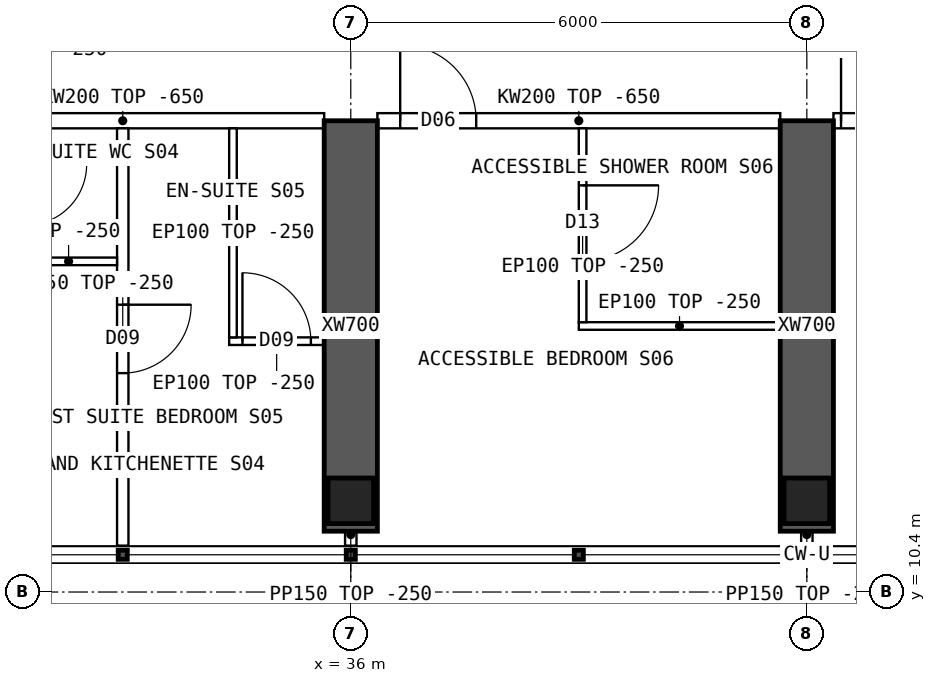
"""IFC4 building model, lengths in metres.
Left out: names, types, materials, properties, quantities, classifications, styles, units other than length and angle.
Written with IfcOpenShell. Run it as: python <this file> out.ifc"""

import sys

from ifc_helpers import new_model, si_unit, direction, frame, frame_2d, origin, origin_2d, place, context, subcontext, project, spatial, polyline, rectangle, hollow_rectangle, outline, extrude, element, fill, save


model = new_model("IFC4")
c1 = context("Model", 3, precision=1e-05, world=origin(), true_north=direction((0.0, 1.0)))
c2 = subcontext(c1, "Body", "Model", "MODEL_VIEW")
j1 = project(units=[si_unit("LENGTHUNIT", "METRE"), si_unit("PLANEANGLEUNIT", "RADIAN")], contexts=[c1])
p1 = place(None, origin())
s1 = spatial("IfcSite", under=j1, at=p1, CompositionType="ELEMENT")
p2 = place(p1, origin())
s2 = spatial("IfcBuilding", under=s1, at=p2, CompositionType="ELEMENT")
p3 = place(p2, frame((0.0, 0.0, 235.3)))
s3 = spatial("IfcBuildingStorey", under=s2, at=p3, CompositionType="ELEMENT", Elevation=235.3)
for number, where, z_axis, x_axis in (
    (1, (36.0, 11.6, 0.0), (0.0, 0.0, 1.0), (1.0, 0.0, 0.0)),
    (2, (42.0, 11.6, 0.0), (0.0, 0.0, 1.0), (1.0, 0.0, 0.0)),
):
    element("IfcColumn", number, at=place(p3, frame(where, z_axis=z_axis, x_axis=x_axis)), inside=s3, PredefinedType="COLUMN", context=c2, shape_type="SweptSolid", body=[
        extrude(hollow_rectangle(XDim=0.6, YDim=0.6, WallThickness=0.06, at=origin_2d()), origin(), (0.0, 0.0, 1.0), 3.75),
    ])
for number, where, z_axis, x_axis in (
    (3, (36.0, 11.2, 0.0), (0.0, 0.0, 1.0), (0.0, 1.0, 0.0)),
    (4, (42.0, 11.2, 0.0), (0.0, 0.0, 1.0), (0.0, 1.0, 0.0)),
):
    element("IfcWall", number, at=place(p3, frame(where, z_axis=z_axis, x_axis=x_axis)), inside=s3, PredefinedType="SHEAR", context=c2, shape_type="SweptSolid", body=[
        extrude(rectangle(XDim=5.4, YDim=0.7, at=frame_2d((2.7, 0.0))), origin(), (0.0, 0.0, 1.0), 3.75),
    ])
p4 = place(p3, frame((30.35, 16.6, 0.0), z_axis=(0.0, 0.0, 1.0), x_axis=(1.0, 0.0, 0.0)))
e5 = element("IfcWall", 5, at=p4, inside=s3, PredefinedType="SOLIDWALL", context=c2, shape_type="SweptSolid", body=[
    extrude(outline(polyline([(0.0, 0.0), (5.3, 0.0), (5.3, 3.1), (0.0, 3.1), (0.0, 0.0)])), frame((0.0, 0.1, 0.0), z_axis=(0.0, -1.0, 0.0), x_axis=(1.0, 0.0, 0.0)), (0.0, 0.0, 1.0), 0.2),
])
p5 = place(p4, frame((0.3, 0.0, 0.0)))
e6 = element("IfcOpeningElement", 6, at=p5, cuts=e5, PredefinedType="OPENING", context=c2, shape_type="SweptSolid", body=[
    extrude(rectangle(XDim=0.9, YDim=2.1, at=frame_2d((0.45, 1.05))), frame((0.0, 0.11, 0.0), z_axis=(0.0, -1.0, 0.0), x_axis=(1.0, 0.0, 0.0)), (0.0, 0.0, 1.0), 0.22),
])
p6 = place(p3, frame((36.35, 16.6, 0.0), z_axis=(0.0, 0.0, 1.0), x_axis=(1.0, 0.0, 0.0)))
e7 = element("IfcWall", 7, at=p6, inside=s3, PredefinedType="SOLIDWALL", context=c2, shape_type="SweptSolid", body=[
    extrude(outline(polyline([(0.0, 0.0), (5.3, 0.0), (5.3, 3.1), (0.0, 3.1), (0.0, 0.0)])), frame((0.0, 0.1, 0.0), z_axis=(0.0, -1.0, 0.0), x_axis=(1.0, 0.0, 0.0)), (0.0, 0.0, 1.0), 0.2),
])
p7 = place(p6, frame((0.3, 0.0, 0.0)))
e8 = element("IfcOpeningElement", 8, at=p7, cuts=e7, PredefinedType="OPENING", context=c2, shape_type="SweptSolid", body=[
    extrude(rectangle(XDim=1.0, YDim=2.1, at=frame_2d((0.5, 1.05))), frame((0.0, 0.11, 0.0), z_axis=(0.0, -1.0, 0.0), x_axis=(1.0, 0.0, 0.0)), (0.0, 0.0, 1.0), 0.22),
])
p8 = place(p3, frame((42.35, 16.6, 0.0), z_axis=(0.0, 0.0, 1.0), x_axis=(1.0, 0.0, 0.0)))
e9 = element("IfcWall", 9, at=p8, inside=s3, PredefinedType="SOLIDWALL", context=c2, shape_type="SweptSolid", body=[
    extrude(outline(polyline([(0.0, 0.0), (5.3, 0.0), (5.3, 3.1), (0.0, 3.1), (0.0, 0.0)])), frame((0.0, 0.1, 0.0), z_axis=(0.0, -1.0, 0.0), x_axis=(1.0, 0.0, 0.0)), (0.0, 0.0, 1.0), 0.2),
])
p9 = place(p8, frame((0.1, 0.0, 0.0)))
e10 = element("IfcOpeningElement", 10, at=p9, cuts=e9, PredefinedType="OPENING", context=c2, shape_type="SweptSolid", body=[
    extrude(rectangle(XDim=0.9, YDim=2.1, at=frame_2d((0.45, 1.05))), frame((0.0, 0.11, 0.0), z_axis=(0.0, -1.0, 0.0), x_axis=(1.0, 0.0, 0.0)), (0.0, 0.0, 1.0), 0.22),
])
p10 = place(p3, frame((33.0, 11.01, 0.0), z_axis=(0.0, 0.0, 1.0), x_axis=(0.0, 1.0, 0.0)))
e11 = element("IfcWall", 11, at=p10, inside=s3, PredefinedType="PARTITIONING", context=c2, shape_type="SweptSolid", body=[
    extrude(outline(polyline([(0.0, 0.0), (5.49, 0.0), (5.49, 3.1), (5.442, 3.1), (5.44, 3.5), (0.792, 3.5), (0.79, 3.1), (0.392, 3.1), (0.39, 3.5), (0.0, 3.5), (0.0, 0.0)])), frame((0.0, 0.075, 0.0), z_axis=(0.0, -1.0, 0.0), x_axis=(1.0, 0.0, 0.0)), (0.0, 0.0, 1.0), 0.15),
])
p11 = place(p10, frame((2.27, 0.0, 0.0)))
e12 = element("IfcOpeningElement", 12, at=p11, cuts=e11, PredefinedType="OPENING", context=c2, shape_type="SweptSolid", body=[
    extrude(rectangle(XDim=0.9, YDim=2.1, at=frame_2d((0.45, 1.05))), frame((0.0, 0.085, 0.0), z_axis=(0.0, -1.0, 0.0), x_axis=(1.0, 0.0, 0.0)), (0.0, 0.0, 1.0), 0.17),
])
p12 = place(p3, frame((35.65, 13.7, 0.0), z_axis=(0.0, 0.0, 1.0), x_axis=(-1.0, 0.0, 0.0)))
e13 = element("IfcWall", 13, at=p12, inside=s3, PredefinedType="PARTITIONING", context=c2, shape_type="SweptSolid", body=[
    extrude(rectangle(XDim=1.25, YDim=0.1, at=frame_2d((0.625, 0.0))), origin(), (0.0, 0.0, 1.0), 3.5),
])
p13 = place(p12, frame((0.175, 0.0, 0.0)))
e14 = element("IfcOpeningElement", 14, at=p13, cuts=e13, PredefinedType="OPENING", context=c2, shape_type="SweptSolid", body=[
    extrude(rectangle(XDim=0.9, YDim=2.1, at=frame_2d((0.45, 1.05))), frame((0.0, 0.06, 0.0), z_axis=(0.0, -1.0, 0.0), x_axis=(1.0, 0.0, 0.0)), (0.0, 0.0, 1.0), 0.12),
])
p14 = place(p3, frame((34.45, 13.75, 0.0), z_axis=(0.0, 0.0, 1.0), x_axis=(0.0, 1.0, 0.0)))
e15 = element("IfcWall", 15, at=p14, inside=s3, PredefinedType="PARTITIONING", context=c2, shape_type="SweptSolid", body=[
    extrude(outline(polyline([(0.0, 0.0), (2.75, 0.0), (2.75, 3.1), (2.702, 3.1), (2.7, 3.5), (0.0, 3.5), (0.0, 0.0)])), frame((0.0, 0.05, 0.0), z_axis=(0.0, -1.0, 0.0), x_axis=(1.0, 0.0, 0.0)), (0.0, 0.0, 1.0), 0.1),
])
p15 = place(p3, frame((31.65, 14.75, 0.0), z_axis=(0.0, 0.0, 1.0), x_axis=(1.0, 0.0, 0.0)))
e16 = element("IfcWall", 16, at=p15, inside=s3, PredefinedType="PARTITIONING", context=c2, shape_type="SweptSolid", body=[
    extrude(rectangle(XDim=1.275, YDim=0.1, at=frame_2d((0.638, 0.0))), origin(), (0.0, 0.0, 1.0), 3.5),
])
p16 = place(p3, frame((39.0, 13.9, 0.0), z_axis=(0.0, 0.0, 1.0), x_axis=(1.0, 0.0, 0.0)))
e17 = element("IfcWall", 17, at=p16, inside=s3, PredefinedType="PARTITIONING", context=c2, shape_type="SweptSolid", body=[
    extrude(rectangle(XDim=2.65, YDim=0.1, at=frame_2d((1.325, 0.0))), origin(), (0.0, 0.0, 1.0), 3.5),
])
p17 = place(p3, frame((39.05, 13.95, 0.0), z_axis=(0.0, 0.0, 1.0), x_axis=(0.0, 1.0, 0.0)))
e18 = element("IfcWall", 18, at=p17, inside=s3, PredefinedType="PARTITIONING", context=c2, shape_type="SweptSolid", body=[
    extrude(outline(polyline([(0.0, 0.0), (2.55, 0.0), (2.55, 3.1), (2.502, 3.1), (2.5, 3.5), (0.0, 3.5), (0.0, 0.0)])), frame((0.0, 0.05, 0.0), z_axis=(0.0, -1.0, 0.0), x_axis=(1.0, 0.0, 0.0)), (0.0, 0.0, 1.0), 0.1),
])
p18 = place(p17, frame((0.8, 0.0, 0.0)))
e19 = element("IfcOpeningElement", 19, at=p18, cuts=e18, PredefinedType="OPENING", context=c2, shape_type="SweptSolid", body=[
    extrude(rectangle(XDim=1.0, YDim=2.1, at=frame_2d((0.5, 1.05))), frame((0.0, 0.06, 0.0), z_axis=(0.0, -1.0, 0.0), x_axis=(1.0, 0.0, 0.0)), (0.0, 0.0, 1.0), 0.12),
])
for number, where, z_axis, x_axis in (
    (20, (36.0, 11.3, 0.0), (0.0, 0.0, 1.0), (0.0, -1.0, 0.0)),
    (21, (42.0, 11.3, 0.0), (0.0, 0.0, 1.0), (0.0, -1.0, 0.0)),
):
    element("IfcWall", number, at=place(p3, frame(where, z_axis=z_axis, x_axis=x_axis)), inside=s3, PredefinedType="PARTITIONING", context=c2, shape_type="SweptSolid", body=[
        extrude(rectangle(XDim=0.29, YDim=0.15, at=frame_2d((0.145, 0.0))), origin(), (0.0, 0.0, 1.0), 3.5),
    ])
p19 = place(p13, origin())
e22 = element("IfcDoor", 22, at=p19, inside=s3, OperationType="SINGLE_SWING_RIGHT", PredefinedType="DOOR", context=c2, shape_type="SweptSolid", body=[
    extrude(rectangle(XDim=0.9, YDim=2.1, at=frame_2d((0.45, 1.05))), frame((0.0, 0.025, 0.0), z_axis=(0.0, -1.0, 0.0), x_axis=(1.0, 0.0, 0.0)), (0.0, 0.0, 1.0), 0.05),
])
fill(e14, e22)
p20 = place(p11, origin())
e23 = element("IfcDoor", 23, at=p20, inside=s3, OperationType="SINGLE_SWING_RIGHT", PredefinedType="DOOR", context=c2, shape_type="SweptSolid", body=[
    extrude(rectangle(XDim=0.9, YDim=2.1, at=frame_2d((0.45, 1.05))), frame((0.0, 0.025, 0.0), z_axis=(0.0, -1.0, 0.0), x_axis=(1.0, 0.0, 0.0)), (0.0, 0.0, 1.0), 0.05),
])
fill(e12, e23)
p21 = place(p18, origin())
e24 = element("IfcDoor", 24, at=p21, inside=s3, OperationType="SINGLE_SWING_RIGHT", PredefinedType="DOOR", context=c2, shape_type="SweptSolid", body=[
    extrude(rectangle(XDim=1.0, YDim=2.1, at=frame_2d((0.5, 1.05))), frame((0.0, 0.025, 0.0), z_axis=(0.0, -1.0, 0.0), x_axis=(1.0, 0.0, 0.0)), (0.0, 0.0, 1.0), 0.05),
])
fill(e19, e24)
p22 = place(p7, origin())
e25 = element("IfcDoor", 25, at=p22, inside=s3, OperationType="SINGLE_SWING_LEFT", PredefinedType="DOOR", context=c2, shape_type="SweptSolid", body=[
    extrude(rectangle(XDim=1.0, YDim=2.1, at=frame_2d((0.5, 1.05))), frame((0.0, 0.025, 0.0), z_axis=(0.0, -1.0, 0.0), x_axis=(1.0, 0.0, 0.0)), (0.0, 0.0, 1.0), 0.05),
])
fill(e8, e25)
p23 = place(p9, origin())
e26 = element("IfcDoor", 26, at=p23, inside=s3, OperationType="SINGLE_SWING_LEFT", PredefinedType="DOOR", context=c2, shape_type="SweptSolid", body=[
    extrude(rectangle(XDim=0.9, YDim=2.1, at=frame_2d((0.45, 1.05))), frame((0.0, 0.025, 0.0), z_axis=(0.0, -1.0, 0.0), x_axis=(1.0, 0.0, 0.0)), (0.0, 0.0, 1.0), 0.05),
])
fill(e10, e26)
save(model, sys.argv[1])
